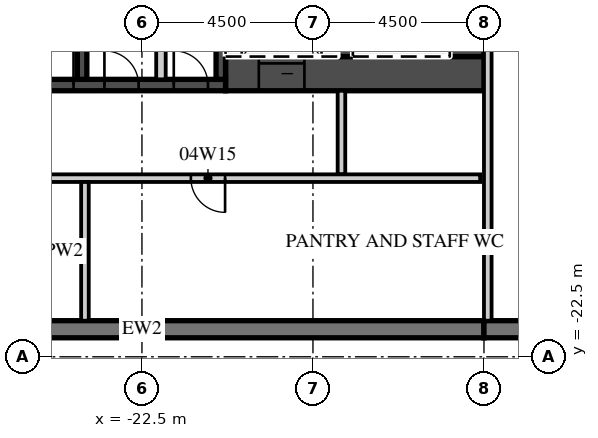
"""IFC4 building model, lengths in metres.
Left out: names, types, materials, properties, quantities, classifications, styles, units other than length and angle.
Written with IfcOpenShell. Run it as: python <this file> out.ifc"""

import sys

from ifc_helpers import new_model, si_unit, direction, frame, frame_2d, origin, place, context, subcontext, project, spatial, rectangle, extrude, element, fill, save


model = new_model("IFC4")
c1 = context("Model", 3, precision=1e-05, world=origin(), true_north=direction((0.0, 1.0)))
c2 = subcontext(c1, "Body", "Model", "MODEL_VIEW")
j1 = project(units=[si_unit("LENGTHUNIT", "METRE"), si_unit("PLANEANGLEUNIT", "RADIAN")], contexts=[c1])
p1 = place(None, origin())
s1 = spatial("IfcSite", under=j1, at=p1, CompositionType="ELEMENT")
p2 = place(p1, origin())
s2 = spatial("IfcBuilding", under=s1, at=p2, CompositionType="ELEMENT")
p3 = place(p2, frame((0.0, 0.0, 29.0)))
s3 = spatial("IfcBuildingStorey", under=s2, at=p3, CompositionType="ELEMENT", Elevation=29.0)
p4 = place(p3, frame((-31.5, -21.775, 0.0), z_axis=(0.0, 0.0, 1.0), x_axis=(1.0, 0.0, 0.0)))
e1 = element("IfcWall", 1, at=p4, inside=s3, PredefinedType="SOLIDWALL", context=c2, shape_type="SweptSolid", body=[
    extrude(rectangle(XDim=18.0, YDim=0.45, at=frame_2d((9.0, 0.0))), origin(), (0.0, 0.0, 1.0), 4.05),
])
p5 = place(p3, frame((-13.5, -21.775, 0.0), z_axis=(0.0, 0.0, 1.0), x_axis=(1.0, 0.0, 0.0)))
e2 = element("IfcWall", 2, at=p5, inside=s3, PredefinedType="SOLIDWALL", context=c2, shape_type="SweptSolid", body=[
    extrude(rectangle(XDim=54.5, YDim=0.45, at=frame_2d((27.25, 0.0))), origin(), (0.0, 0.0, 1.0), 4.05),
])
p6 = place(p5, frame((1.05, 0.0, 0.9)))
e3 = element("IfcOpeningElement", 3, at=p6, cuts=e2, PredefinedType="OPENING", context=c2, shape_type="SweptSolid", body=[
    extrude(rectangle(XDim=2.4, YDim=1.8, at=frame_2d((1.2, 0.9))), frame((0.0, 0.235, 0.0), z_axis=(0.0, -1.0, 0.0), x_axis=(1.0, 0.0, 0.0)), (0.0, 0.0, 1.0), 0.47),
])
p7 = place(p5, frame((5.55, 0.0, 0.9)))
e4 = element("IfcOpeningElement", 4, at=p7, cuts=e2, PredefinedType="OPENING", context=c2, shape_type="SweptSolid", body=[
    extrude(rectangle(XDim=2.4, YDim=1.8, at=frame_2d((1.2, 0.9))), frame((0.0, 0.235, 0.0), z_axis=(0.0, -1.0, 0.0), x_axis=(1.0, 0.0, 0.0)), (0.0, 0.0, 1.0), 0.47),
])
p8 = place(p5, frame((10.05, 0.0, 0.9)))
e5 = element("IfcOpeningElement", 5, at=p8, cuts=e2, PredefinedType="OPENING", context=c2, shape_type="SweptSolid", body=[
    extrude(rectangle(XDim=2.4, YDim=1.8, at=frame_2d((1.2, 0.9))), frame((0.0, 0.235, 0.0), z_axis=(0.0, -1.0, 0.0), x_axis=(1.0, 0.0, 0.0)), (0.0, 0.0, 1.0), 0.47),
])
p9 = place(p5, frame((14.55, 0.0, 0.9)))
e6 = element("IfcOpeningElement", 6, at=p9, cuts=e2, PredefinedType="OPENING", context=c2, shape_type="SweptSolid", body=[
    extrude(rectangle(XDim=2.4, YDim=1.8, at=frame_2d((1.2, 0.9))), frame((0.0, 0.235, 0.0), z_axis=(0.0, -1.0, 0.0), x_axis=(1.0, 0.0, 0.0)), (0.0, 0.0, 1.0), 0.47),
])
p10 = place(p5, frame((19.05, 0.0, 0.9)))
e7 = element("IfcOpeningElement", 7, at=p10, cuts=e2, PredefinedType="OPENING", context=c2, shape_type="SweptSolid", body=[
    extrude(rectangle(XDim=2.4, YDim=1.8, at=frame_2d((1.2, 0.9))), frame((0.0, 0.235, 0.0), z_axis=(0.0, -1.0, 0.0), x_axis=(1.0, 0.0, 0.0)), (0.0, 0.0, 1.0), 0.47),
])
p11 = place(p5, frame((23.55, 0.0, 0.9)))
e8 = element("IfcOpeningElement", 8, at=p11, cuts=e2, PredefinedType="OPENING", context=c2, shape_type="SweptSolid", body=[
    extrude(rectangle(XDim=2.4, YDim=1.8, at=frame_2d((1.2, 0.9))), frame((0.0, 0.235, 0.0), z_axis=(0.0, -1.0, 0.0), x_axis=(1.0, 0.0, 0.0)), (0.0, 0.0, 1.0), 0.47),
])
p12 = place(p5, frame((28.05, 0.0, 0.9)))
e9 = element("IfcOpeningElement", 9, at=p12, cuts=e2, PredefinedType="OPENING", context=c2, shape_type="SweptSolid", body=[
    extrude(rectangle(XDim=2.4, YDim=1.8, at=frame_2d((1.2, 0.9))), frame((0.0, 0.235, 0.0), z_axis=(0.0, -1.0, 0.0), x_axis=(1.0, 0.0, 0.0)), (0.0, 0.0, 1.0), 0.47),
])
p13 = place(p5, frame((32.55, 0.0, 0.9)))
e10 = element("IfcOpeningElement", 10, at=p13, cuts=e2, PredefinedType="OPENING", context=c2, shape_type="SweptSolid", body=[
    extrude(rectangle(XDim=2.4, YDim=1.8, at=frame_2d((1.2, 0.9))), frame((0.0, 0.235, 0.0), z_axis=(0.0, -1.0, 0.0), x_axis=(1.0, 0.0, 0.0)), (0.0, 0.0, 1.0), 0.47),
])
p14 = place(p5, frame((37.05, 0.0, 0.9)))
e11 = element("IfcOpeningElement", 11, at=p14, cuts=e2, PredefinedType="OPENING", context=c2, shape_type="SweptSolid", body=[
    extrude(rectangle(XDim=2.4, YDim=1.8, at=frame_2d((1.2, 0.9))), frame((0.0, 0.235, 0.0), z_axis=(0.0, -1.0, 0.0), x_axis=(1.0, 0.0, 0.0)), (0.0, 0.0, 1.0), 0.47),
])
p15 = place(p5, frame((41.55, 0.0, 0.9)))
e12 = element("IfcOpeningElement", 12, at=p15, cuts=e2, PredefinedType="OPENING", context=c2, shape_type="SweptSolid", body=[
    extrude(rectangle(XDim=2.4, YDim=1.8, at=frame_2d((1.2, 0.9))), frame((0.0, 0.235, 0.0), z_axis=(0.0, -1.0, 0.0), x_axis=(1.0, 0.0, 0.0)), (0.0, 0.0, 1.0), 0.47),
])
p16 = place(p5, frame((46.05, 0.0, 0.9)))
e13 = element("IfcOpeningElement", 13, at=p16, cuts=e2, PredefinedType="OPENING", context=c2, shape_type="SweptSolid", body=[
    extrude(rectangle(XDim=2.4, YDim=1.8, at=frame_2d((1.2, 0.9))), frame((0.0, 0.235, 0.0), z_axis=(0.0, -1.0, 0.0), x_axis=(1.0, 0.0, 0.0)), (0.0, 0.0, 1.0), 0.47),
])
p17 = place(p3, frame((-20.3, -15.05, 0.0), z_axis=(0.0, 0.0, 1.0), x_axis=(1.0, 0.0, 0.0)))
e14 = element("IfcWall", 14, at=p17, inside=s3, PredefinedType="SHEAR", context=c2, shape_type="SweptSolid", body=[
    extrude(rectangle(XDim=6.8, YDim=0.9, at=frame_2d((3.4, 0.0))), origin(), (0.0, 0.0, 1.0), 4.05),
])
p18 = place(p17, frame((0.875, 0.0, 0.0)))
e15 = element("IfcOpeningElement", 15, at=p18, cuts=e14, PredefinedType="OPENING", context=c2, shape_type="SweptSolid", body=[
    extrude(rectangle(XDim=1.2, YDim=2.1, at=frame_2d((0.6, 1.05))), frame((0.0, 0.46, 0.0), z_axis=(0.0, -1.0, 0.0), x_axis=(1.0, 0.0, 0.0)), (0.0, 0.0, 1.0), 0.92),
])
p19 = place(p3, frame((-30.6, -15.35, 0.0), z_axis=(0.0, 0.0, 1.0), x_axis=(1.0, 0.0, 0.0)))
e16 = element("IfcWall", 16, at=p19, inside=s3, PredefinedType="SHEAR", context=c2, shape_type="SweptSolid", body=[
    extrude(rectangle(XDim=10.3, YDim=0.3, at=frame_2d((5.15, 0.0))), origin(), (0.0, 0.0, 1.0), 4.05),
])
p20 = place(p19, frame((5.0, 0.0, 0.0)))
e17 = element("IfcOpeningElement", 17, at=p20, cuts=e16, PredefinedType="OPENING", context=c2, shape_type="SweptSolid", body=[
    extrude(rectangle(XDim=1.3, YDim=2.1, at=frame_2d((0.65, 1.05))), frame((0.0, 0.16, 0.0), z_axis=(0.0, -1.0, 0.0), x_axis=(1.0, 0.0, 0.0)), (0.0, 0.0, 1.0), 0.32),
])
p21 = place(p19, frame((7.113, 0.0, 0.0)))
e18 = element("IfcOpeningElement", 18, at=p21, cuts=e16, PredefinedType="OPENING", context=c2, shape_type="SweptSolid", body=[
    extrude(rectangle(XDim=0.9, YDim=2.1, at=frame_2d((0.45, 1.05))), frame((0.0, 0.16, 0.0), z_axis=(0.0, -1.0, 0.0), x_axis=(1.0, 0.0, 0.0)), (0.0, 0.0, 1.0), 0.32),
])
p22 = place(p19, frame((8.938, 0.0, 0.0)))
e19 = element("IfcOpeningElement", 19, at=p22, cuts=e16, PredefinedType="OPENING", context=c2, shape_type="SweptSolid", body=[
    extrude(rectangle(XDim=0.9, YDim=2.1, at=frame_2d((0.45, 1.05))), frame((0.0, 0.16, 0.0), z_axis=(0.0, -1.0, 0.0), x_axis=(1.0, 0.0, 0.0)), (0.0, 0.0, 1.0), 0.32),
])
p23 = place(p3, frame((-13.95, -14.6, 0.0), z_axis=(0.0, 0.0, 1.0), x_axis=(0.0, 1.0, 0.0)))
e20 = element("IfcWall", 20, at=p23, inside=s3, PredefinedType="SHEAR", context=c2, shape_type="SweptSolid", body=[
    extrude(rectangle(XDim=12.2, YDim=0.9, at=frame_2d((6.1, 0.0))), origin(), (0.0, 0.0, 1.0), 4.05),
])
p24 = place(p3, frame((-17.15, -14.6, 0.0), z_axis=(0.0, 0.0, 1.0), x_axis=(0.0, 1.0, 0.0)))
e21 = element("IfcWall", 21, at=p24, inside=s3, PredefinedType="SHEAR", context=c2, shape_type="SweptSolid", body=[
    extrude(rectangle(XDim=5.8, YDim=0.4, at=frame_2d((2.9, 0.0))), origin(), (0.0, 0.0, 1.0), 4.05),
])
for number, where, z_axis, x_axis in (
    (22, (-20.425, -15.2, 0.0), (0.0, 0.0, 1.0), (0.0, 1.0, 0.0)),
    (23, (-24.075, -15.2, 0.0), (0.0, 0.0, 1.0), (0.0, 1.0, 0.0)),
):
    element("IfcWall", number, at=place(p3, frame(where, z_axis=z_axis, x_axis=x_axis)), inside=s3, PredefinedType="SHEAR", context=c2, shape_type="SweptSolid", body=[
        extrude(rectangle(XDim=3.25, YDim=0.25, at=frame_2d((1.625, 0.0))), origin(), (0.0, 0.0, 1.0), 4.05),
    ])
p25 = place(p3, frame((-22.0, -15.2, 0.0), z_axis=(0.0, 0.0, 1.0), x_axis=(0.0, 1.0, 0.0)))
e24 = element("IfcWall", 24, at=p25, inside=s3, PredefinedType="PARTITIONING", context=c2, shape_type="SweptSolid", body=[
    extrude(rectangle(XDim=3.25, YDim=0.25, at=frame_2d((1.625, 0.0))), origin(), (0.0, 0.0, 1.0), 4.05),
])
p26 = place(p3, frame((-17.25, -17.7, 0.0), z_axis=(0.0, 0.0, 1.0), x_axis=(0.0, 1.0, 0.0)))
e25 = element("IfcWall", 25, at=p26, inside=s3, PredefinedType="PARTITIONING", context=c2, shape_type="SweptSolid", body=[
    extrude(rectangle(XDim=2.2, YDim=0.2, at=frame_2d((1.1, 0.0))), origin(), (0.0, 0.0, 1.0), 4.05),
])
p27 = place(p3, frame((-44.55, -17.8, 0.0), z_axis=(0.0, 0.0, 1.0), x_axis=(1.0, 0.0, 0.0)))
e26 = element("IfcWall", 26, at=p27, inside=s3, PredefinedType="PARTITIONING", context=c2, shape_type="SweptSolid", body=[
    extrude(rectangle(XDim=30.95, YDim=0.2, at=frame_2d((15.475, 0.0))), origin(), (0.0, 0.0, 1.0), 4.05),
])
p28 = place(p27, frame((15.038, 0.0, 0.0)))
e27 = element("IfcOpeningElement", 27, at=p28, cuts=e26, PredefinedType="OPENING", context=c2, shape_type="SweptSolid", body=[
    extrude(rectangle(XDim=0.9, YDim=2.1, at=frame_2d((0.45, 1.05))), frame((0.0, 0.11, 0.0), z_axis=(0.0, -1.0, 0.0), x_axis=(1.0, 0.0, 0.0)), (0.0, 0.0, 1.0), 0.22),
])
p29 = place(p27, frame((23.337, 0.0, 0.0)))
e28 = element("IfcOpeningElement", 28, at=p29, cuts=e26, PredefinedType="OPENING", context=c2, shape_type="SweptSolid", body=[
    extrude(rectangle(XDim=0.9, YDim=2.1, at=frame_2d((0.45, 1.05))), frame((0.0, 0.11, 0.0), z_axis=(0.0, -1.0, 0.0), x_axis=(1.0, 0.0, 0.0)), (0.0, 0.0, 1.0), 0.22),
])
p30 = place(p3, frame((-24.0, -21.55, 0.0), z_axis=(0.0, 0.0, 1.0), x_axis=(0.0, 1.0, 0.0)))
e29 = element("IfcWall", 29, at=p30, inside=s3, PredefinedType="PARTITIONING", context=c2, shape_type="SweptSolid", body=[
    extrude(rectangle(XDim=3.65, YDim=0.2, at=frame_2d((1.825, 0.0))), origin(), (0.0, 0.0, 1.0), 4.05),
])
p31 = place(p3, frame((-13.4, -21.55, 0.0), z_axis=(0.0, 0.0, 1.0), x_axis=(0.0, 1.0, 0.0)))
e30 = element("IfcWall", 30, at=p31, inside=s3, PredefinedType="PARTITIONING", context=c2, shape_type="SweptSolid", body=[
    extrude(rectangle(XDim=19.85, YDim=0.2, at=frame_2d((9.925, 0.0))), origin(), (0.0, 0.0, 1.0), 4.05),
])
p32 = place(p18, origin())
e31 = element("IfcDoor", 31, at=p32, inside=s3, OperationType="SLIDING_TO_LEFT", PredefinedType="DOOR", context=c2, shape_type="SweptSolid", body=[
    extrude(rectangle(XDim=1.2, YDim=2.1, at=frame_2d((0.6, 1.05))), frame((0.0, 0.025, 0.0), z_axis=(0.0, -1.0, 0.0), x_axis=(1.0, 0.0, 0.0)), (0.0, 0.0, 1.0), 0.05),
])
fill(e15, e31)
p33 = place(p20, origin())
e32 = element("IfcDoor", 32, at=p33, inside=s3, OperationType="SINGLE_SWING_RIGHT", PredefinedType="DOOR", context=c2, shape_type="SweptSolid", body=[
    extrude(rectangle(XDim=1.3, YDim=2.1, at=frame_2d((0.65, 1.05))), frame((0.0, 0.025, 0.0), z_axis=(0.0, -1.0, 0.0), x_axis=(1.0, 0.0, 0.0)), (0.0, 0.0, 1.0), 0.05),
])
fill(e17, e32)
p34 = place(p21, origin())
e33 = element("IfcDoor", 33, at=p34, inside=s3, OperationType="SINGLE_SWING_LEFT", PredefinedType="DOOR", context=c2, shape_type="SweptSolid", body=[
    extrude(rectangle(XDim=0.9, YDim=2.1, at=frame_2d((0.45, 1.05))), frame((0.0, 0.025, 0.0), z_axis=(0.0, -1.0, 0.0), x_axis=(1.0, 0.0, 0.0)), (0.0, 0.0, 1.0), 0.05),
])
fill(e18, e33)
p35 = place(p22, origin())
e34 = element("IfcDoor", 34, at=p35, inside=s3, OperationType="SINGLE_SWING_LEFT", PredefinedType="DOOR", context=c2, shape_type="SweptSolid", body=[
    extrude(rectangle(XDim=0.9, YDim=2.1, at=frame_2d((0.45, 1.05))), frame((0.0, 0.025, 0.0), z_axis=(0.0, -1.0, 0.0), x_axis=(1.0, 0.0, 0.0)), (0.0, 0.0, 1.0), 0.05),
])
fill(e19, e34)
p36 = place(p29, origin())
e35 = element("IfcDoor", 35, at=p36, inside=s3, OperationType="SINGLE_SWING_RIGHT", PredefinedType="DOOR", context=c2, shape_type="SweptSolid", body=[
    extrude(rectangle(XDim=0.9, YDim=2.1, at=frame_2d((0.45, 1.05))), frame((0.0, 0.025, 0.0), z_axis=(0.0, -1.0, 0.0), x_axis=(1.0, 0.0, 0.0)), (0.0, 0.0, 1.0), 0.05),
])
fill(e28, e35)
save(model, sys.argv[1])
